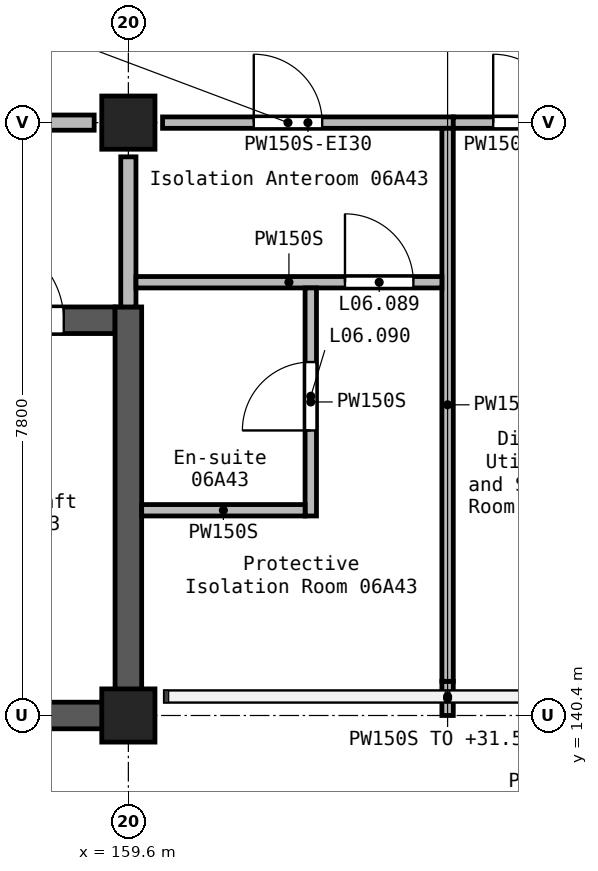
"""IFC4 building model, lengths in metres.
Left out: names, types, materials, properties, quantities, classifications, styles, units other than length and angle.
Written with IfcOpenShell. Run it as: python <this file> out.ifc"""

import sys

from ifc_helpers import new_model, si_unit, direction, frame, frame_2d, origin, origin_2d, place, context, subcontext, project, spatial, rectangle, extrude, element, fill, save


model = new_model("IFC4")
c1 = context("Model", 3, precision=1e-05, world=origin(), true_north=direction((0.0, 1.0)))
c2 = subcontext(c1, "Body", "Model", "MODEL_VIEW")
j1 = project(units=[si_unit("LENGTHUNIT", "METRE"), si_unit("PLANEANGLEUNIT", "RADIAN")], contexts=[c1])
p1 = place(None, origin())
s1 = spatial("IfcSite", under=j1, at=p1, CompositionType="ELEMENT")
p2 = place(p1, origin())
s2 = spatial("IfcBuilding", under=s1, at=p2, CompositionType="ELEMENT")
p3 = place(p2, frame((0.0, 0.0, 28.8)))
s3 = spatial("IfcBuildingStorey", under=s2, at=p3, CompositionType="ELEMENT", Elevation=28.8)
for number, where, z_axis, x_axis in (
    (1, (159.6, 140.4, 0.0), (0.0, 0.0, 1.0), (1.0, 0.0, 0.0)),
    (2, (159.6, 148.2, 0.0), (0.0, 0.0, 1.0), (1.0, 0.0, 0.0)),
):
    element("IfcColumn", number, at=place(p3, frame(where, z_axis=z_axis, x_axis=x_axis)), inside=s3, PredefinedType="COLUMN", context=c2, shape_type="SweptSolid", body=[
        extrude(rectangle(XDim=0.7, YDim=0.7, at=origin_2d()), origin(), (0.0, 0.0, 1.0), 3.9),
    ])
p4 = place(p3, frame((156.8, 140.4, 0.0), z_axis=(0.0, 0.0, 1.0), x_axis=(1.0, 0.0, 0.0)))
e3 = element("IfcWall", 3, at=p4, inside=s3, PredefinedType="SHEAR", context=c2, shape_type="SweptSolid", body=[
    extrude(rectangle(XDim=2.625, YDim=0.35, at=frame_2d((1.312, 0.0))), origin(), (0.0, 0.0, 1.0), 3.9),
])
p5 = place(p3, frame((156.8, 145.6, 0.0), z_axis=(0.0, 0.0, 1.0), x_axis=(1.0, 0.0, 0.0)))
e4 = element("IfcWall", 4, at=p5, inside=s3, PredefinedType="SHEAR", context=c2, shape_type="SweptSolid", body=[
    extrude(rectangle(XDim=2.625, YDim=0.35, at=frame_2d((1.312, 0.0))), origin(), (0.0, 0.0, 1.0), 3.9),
])
p6 = place(p5, frame((0.85, 0.0, 0.0)))
e5 = element("IfcOpeningElement", 5, at=p6, cuts=e4, PredefinedType="OPENING", context=c2, shape_type="SweptSolid", body=[
    extrude(rectangle(XDim=1.1, YDim=2.1, at=frame_2d((0.55, 1.05))), frame((0.0, 0.185, 0.0), z_axis=(0.0, -1.0, 0.0), x_axis=(1.0, 0.0, 0.0)), (0.0, 0.0, 1.0), 0.37),
])
p7 = place(p3, frame((159.6, 140.225, 0.0), z_axis=(0.0, 0.0, 1.0), x_axis=(0.0, 1.0, 0.0)))
e6 = element("IfcWall", 6, at=p7, inside=s3, PredefinedType="SHEAR", context=c2, shape_type="SweptSolid", body=[
    extrude(rectangle(XDim=5.55, YDim=0.35, at=frame_2d((2.775, 0.0))), origin(), (0.0, 0.0, 1.0), 3.9),
])
p8 = place(p3, frame((151.65, 148.2, 0.0), z_axis=(0.0, 0.0, 1.0), x_axis=(1.0, 0.0, 0.0)))
e7 = element("IfcWall", 7, at=p8, inside=s3, PredefinedType="SOLIDWALL", context=c2, shape_type="SweptSolid", body=[
    extrude(rectangle(XDim=7.5, YDim=0.2, at=frame_2d((3.75, 0.0))), origin(), (0.0, 0.0, 1.0), 3.6),
])
p9 = place(p8, frame((2.85, 0.0, 0.0)))
e8 = element("IfcOpeningElement", 8, at=p9, cuts=e7, PredefinedType="OPENING", context=c2, shape_type="SweptSolid", body=[
    extrude(rectangle(XDim=1.8, YDim=2.1, at=frame_2d((0.9, 1.05))), frame((0.0, 0.11, 0.0), z_axis=(0.0, -1.0, 0.0), x_axis=(1.0, 0.0, 0.0)), (0.0, 0.0, 1.0), 0.22),
])
p10 = place(p3, frame((159.6, 145.775, 0.0), z_axis=(0.0, 0.0, 1.0), x_axis=(0.0, 1.0, 0.0)))
e9 = element("IfcWall", 9, at=p10, inside=s3, PredefinedType="SOLIDWALL", context=c2, shape_type="SweptSolid", body=[
    extrude(rectangle(XDim=1.975, YDim=0.2, at=frame_2d((0.988, 0.0))), origin(), (0.0, 0.0, 1.0), 3.6),
])
p11 = place(p3, frame((160.05, 148.2, 0.0), z_axis=(0.0, 0.0, 1.0), x_axis=(1.0, 0.0, 0.0)))
e10 = element("IfcWall", 10, at=p11, inside=s3, PredefinedType="PARTITIONING", context=c2, shape_type="SweptSolid", body=[
    extrude(rectangle(XDim=3.825, YDim=0.15, at=frame_2d((1.913, 0.0))), origin(), (0.0, 0.0, 1.0), 3.6),
])
p12 = place(p11, frame((1.2, 0.0, 0.0)))
e11 = element("IfcOpeningElement", 11, at=p12, cuts=e10, PredefinedType="OPENING", context=c2, shape_type="SweptSolid", body=[
    extrude(rectangle(XDim=0.9, YDim=2.1, at=frame_2d((0.45, 1.05))), frame((0.0, 0.085, 0.0), z_axis=(0.0, -1.0, 0.0), x_axis=(1.0, 0.0, 0.0)), (0.0, 0.0, 1.0), 0.17),
])
p13 = place(p3, frame((163.875, 148.2, 0.0), z_axis=(0.0, 0.0, 1.0), x_axis=(1.0, 0.0, 0.0)))
e12 = element("IfcWall", 12, at=p13, inside=s3, PredefinedType="PARTITIONING", context=c2, shape_type="SweptSolid", body=[
    extrude(rectangle(XDim=1.95, YDim=0.15, at=frame_2d((0.975, 0.0))), origin(), (0.0, 0.0, 1.0), 3.6),
])
p14 = place(p13, frame((0.525, 0.0, 0.0)))
e13 = element("IfcOpeningElement", 13, at=p14, cuts=e12, PredefinedType="OPENING", context=c2, shape_type="SweptSolid", body=[
    extrude(rectangle(XDim=0.9, YDim=2.1, at=frame_2d((0.45, 1.05))), frame((0.0, 0.085, 0.0), z_axis=(0.0, -1.0, 0.0), x_axis=(1.0, 0.0, 0.0)), (0.0, 0.0, 1.0), 0.17),
])
p15 = place(p3, frame((163.8, 140.4, 0.0), z_axis=(0.0, 0.0, 1.0), x_axis=(0.0, 1.0, 0.0)))
e14 = element("IfcWall", 14, at=p15, inside=s3, PredefinedType="PARTITIONING", context=c2, shape_type="SweptSolid", body=[
    extrude(rectangle(XDim=0.45, YDim=0.15, at=frame_2d((0.225, 0.0))), origin(), (0.0, 0.0, 1.0), 2.78),
])
p16 = place(p3, frame((163.8, 140.85, 0.0), z_axis=(0.0, 0.0, 1.0), x_axis=(0.0, 1.0, 0.0)))
e15 = element("IfcWall", 15, at=p16, inside=s3, PredefinedType="PARTITIONING", context=c2, shape_type="SweptSolid", body=[
    extrude(rectangle(XDim=7.275, YDim=0.15, at=frame_2d((3.637, 0.0))), origin(), (0.0, 0.0, 1.0), 3.6),
])
p17 = place(p3, frame((159.7, 146.1, 0.0), z_axis=(0.0, 0.0, 1.0), x_axis=(1.0, 0.0, 0.0)))
e16 = element("IfcWall", 16, at=p17, inside=s3, PredefinedType="PARTITIONING", context=c2, shape_type="SweptSolid", body=[
    extrude(rectangle(XDim=4.025, YDim=0.15, at=frame_2d((2.013, 0.0))), origin(), (0.0, 0.0, 1.0), 3.6),
])
p18 = place(p17, frame((2.75, 0.0, 0.0)))
e17 = element("IfcOpeningElement", 17, at=p18, cuts=e16, PredefinedType="OPENING", context=c2, shape_type="SweptSolid", body=[
    extrude(rectangle(XDim=0.9, YDim=2.1, at=frame_2d((0.45, 1.05))), frame((0.0, 0.085, 0.0), z_axis=(0.0, -1.0, 0.0), x_axis=(1.0, 0.0, 0.0)), (0.0, 0.0, 1.0), 0.17),
])
p19 = place(p3, frame((162.0, 143.025, 0.0), z_axis=(0.0, 0.0, 1.0), x_axis=(0.0, 1.0, 0.0)))
e18 = element("IfcWall", 18, at=p19, inside=s3, PredefinedType="PARTITIONING", context=c2, shape_type="SweptSolid", body=[
    extrude(rectangle(XDim=3.0, YDim=0.15, at=frame_2d((1.5, 0.0))), origin(), (0.0, 0.0, 1.0), 3.6),
])
p20 = place(p19, frame((1.125, 0.0, 0.0)))
e19 = element("IfcOpeningElement", 19, at=p20, cuts=e18, PredefinedType="OPENING", context=c2, shape_type="SweptSolid", body=[
    extrude(rectangle(XDim=0.9, YDim=2.1, at=frame_2d((0.45, 1.05))), frame((0.0, 0.085, 0.0), z_axis=(0.0, -1.0, 0.0), x_axis=(1.0, 0.0, 0.0)), (0.0, 0.0, 1.0), 0.17),
])
p21 = place(p3, frame((159.775, 143.1, 0.0), z_axis=(0.0, 0.0, 1.0), x_axis=(1.0, 0.0, 0.0)))
e20 = element("IfcWall", 20, at=p21, inside=s3, PredefinedType="PARTITIONING", context=c2, shape_type="SweptSolid", body=[
    extrude(rectangle(XDim=2.15, YDim=0.15, at=frame_2d((1.075, 0.0))), origin(), (0.0, 0.0, 1.0), 3.6),
])
p22 = place(p12, frame((0.9, 0.0, 0.0), z_axis=(0.0, 0.0, 1.0), x_axis=(-1.0, 0.0, 0.0)))
e21 = element("IfcDoor", 21, at=p22, inside=s3, OperationType="SINGLE_SWING_RIGHT", PredefinedType="DOOR", context=c2, shape_type="SweptSolid", body=[
    extrude(rectangle(XDim=0.9, YDim=2.1, at=frame_2d((0.45, 1.05))), frame((0.0, 0.025, 0.0), z_axis=(0.0, -1.0, 0.0), x_axis=(1.0, 0.0, 0.0)), (0.0, 0.0, 1.0), 0.05),
])
fill(e11, e21)
p23 = place(p18, frame((0.9, 0.0, 0.0), z_axis=(0.0, 0.0, 1.0), x_axis=(-1.0, 0.0, 0.0)))
e22 = element("IfcDoor", 22, at=p23, inside=s3, OperationType="SINGLE_SWING_LEFT", PredefinedType="DOOR", context=c2, shape_type="SweptSolid", body=[
    extrude(rectangle(XDim=0.9, YDim=2.1, at=frame_2d((0.45, 1.05))), frame((0.0, 0.025, 0.0), z_axis=(0.0, -1.0, 0.0), x_axis=(1.0, 0.0, 0.0)), (0.0, 0.0, 1.0), 0.05),
])
fill(e17, e22)
p24 = place(p20, origin())
e23 = element("IfcDoor", 23, at=p24, inside=s3, OperationType="SINGLE_SWING_RIGHT", PredefinedType="DOOR", context=c2, shape_type="SweptSolid", body=[
    extrude(rectangle(XDim=0.9, YDim=2.1, at=frame_2d((0.45, 1.05))), frame((0.0, 0.025, 0.0), z_axis=(0.0, -1.0, 0.0), x_axis=(1.0, 0.0, 0.0)), (0.0, 0.0, 1.0), 0.05),
])
fill(e19, e23)
p25 = place(p14, frame((0.9, 0.0, 0.0), z_axis=(0.0, 0.0, 1.0), x_axis=(-1.0, 0.0, 0.0)))
e24 = element("IfcDoor", 24, at=p25, inside=s3, OperationType="SINGLE_SWING_LEFT", PredefinedType="DOOR", context=c2, shape_type="SweptSolid", body=[
    extrude(rectangle(XDim=0.9, YDim=2.1, at=frame_2d((0.45, 1.05))), frame((0.0, 0.025, 0.0), z_axis=(0.0, -1.0, 0.0), x_axis=(1.0, 0.0, 0.0)), (0.0, 0.0, 1.0), 0.05),
])
fill(e13, e24)
p26 = place(p6, origin())
e25 = element("IfcDoor", 25, at=p26, inside=s3, OperationType="DOUBLE_DOOR_SLIDING", PredefinedType="DOOR", context=c2, shape_type="SweptSolid", body=[
    extrude(rectangle(XDim=1.1, YDim=2.1, at=frame_2d((0.55, 1.05))), frame((0.0, 0.025, 0.0), z_axis=(0.0, -1.0, 0.0), x_axis=(1.0, 0.0, 0.0)), (0.0, 0.0, 1.0), 0.05),
])
fill(e5, e25)
save(model, sys.argv[1])
